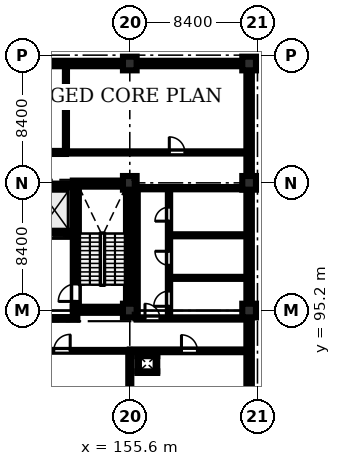
"""IFC4 building model, lengths in metres.
Left out: names, types, materials, properties, quantities, classifications, styles, units other than length and angle.
Written with IfcOpenShell. Run it as: python <this file> out.ifc"""

import sys

from ifc_helpers import new_model, si_unit, direction, frame, frame_2d, origin, origin_2d, place, context, subcontext, project, spatial, rectangle, extrude, element, fill, save


model = new_model("IFC4")
c1 = context("Model", 3, precision=1e-05, world=origin(), true_north=direction((0.0, 1.0)))
c2 = subcontext(c1, "Body", "Model", "MODEL_VIEW")
j1 = project(units=[si_unit("LENGTHUNIT", "METRE"), si_unit("PLANEANGLEUNIT", "RADIAN")], contexts=[c1])
p1 = place(None, origin())
s1 = spatial("IfcSite", under=j1, at=p1, CompositionType="ELEMENT")
p2 = place(p1, origin())
s2 = spatial("IfcBuilding", under=s1, at=p2, CompositionType="ELEMENT")
p3 = place(p2, frame((0.0, 0.0, 19.2)))
s3 = spatial("IfcBuildingStorey", under=s2, at=p3, CompositionType="ELEMENT", Elevation=19.2)
for number, where, z_axis, x_axis in (
    (1, (155.6, 95.2, 0.0), (0.0, 0.0, 1.0), (1.0, 0.0, 0.0)),
    (2, (155.6, 103.6, 0.0), (0.0, 0.0, 1.0), (1.0, 0.0, 0.0)),
    (3, (155.6, 111.45, 0.0), (0.0, 0.0, 1.0), (1.0, 0.0, 0.0)),
    (4, (163.45, 95.2, 0.0), (0.0, 0.0, 1.0), (1.0, 0.0, 0.0)),
    (5, (163.45, 103.6, 0.0), (0.0, 0.0, 1.0), (1.0, 0.0, 0.0)),
    (6, (163.45, 111.45, 0.0), (0.0, 0.0, 1.0), (1.0, 0.0, 0.0)),
):
    element("IfcColumn", number, at=place(p3, frame(where, z_axis=z_axis, x_axis=x_axis)), inside=s3, PredefinedType="COLUMN", context=c2, shape_type="SweptSolid", body=[
        extrude(rectangle(XDim=0.9, YDim=0.9, at=origin_2d()), origin(), (0.0, 0.0, 1.0), 4.02),
    ])
for number, where, z_axis, x_axis in (
    (7, (151.85, 95.25, 0.0), (0.0, 0.0, 1.0), (1.0, 0.0, 0.0)),
    (8, (151.85, 103.55, 0.0), (0.0, 0.0, 1.0), (1.0, 0.0, 0.0)),
):
    element("IfcWall", number, at=place(p3, frame(where, z_axis=z_axis, x_axis=x_axis)), inside=s3, PredefinedType="SHEAR", context=c2, shape_type="SweptSolid", body=[
        extrude(rectangle(XDim=3.9, YDim=0.4, at=frame_2d((1.95, 0.0))), origin(), (0.0, 0.0, 1.0), 4.02),
    ])
p4 = place(p3, frame((152.05, 95.45, 0.0), z_axis=(0.0, 0.0, 1.0), x_axis=(0.0, 1.0, 0.0)))
e9 = element("IfcWall", 9, at=p4, inside=s3, PredefinedType="SHEAR", context=c2, shape_type="SweptSolid", body=[
    extrude(rectangle(XDim=7.9, YDim=0.4, at=frame_2d((3.95, 0.0))), origin(), (0.0, 0.0, 1.0), 4.02),
])
p5 = place(p4, frame((0.35, 0.0, 0.0)))
e10 = element("IfcOpeningElement", 10, at=p5, cuts=e9, PredefinedType="OPENING", context=c2, shape_type="SweptSolid", body=[
    extrude(rectangle(XDim=1.15, YDim=2.15, at=frame_2d((0.575, 1.075))), frame((0.0, 0.21, 0.0), z_axis=(0.0, -1.0, 0.0), x_axis=(1.0, 0.0, 0.0)), (0.0, 0.0, 1.0), 0.42),
])
p6 = place(p3, frame((155.55, 95.45, 0.0), z_axis=(0.0, 0.0, 1.0), x_axis=(0.0, 1.0, 0.0)))
e11 = element("IfcWall", 11, at=p6, inside=s3, PredefinedType="SHEAR", context=c2, shape_type="SweptSolid", body=[
    extrude(rectangle(XDim=7.9, YDim=0.4, at=frame_2d((3.95, 0.0))), origin(), (0.0, 0.0, 1.0), 4.02),
])
p7 = place(p3, frame((149.45, 100.175, 0.0), z_axis=(0.0, 0.0, 1.0), x_axis=(1.0, 0.0, 0.0)))
e12 = element("IfcWall", 12, at=p7, inside=s3, PredefinedType="SHEAR", context=c2, shape_type="SweptSolid", body=[
    extrude(rectangle(XDim=2.4, YDim=0.25, at=frame_2d((1.2, 0.0))), origin(), (0.0, 0.0, 1.0), 4.02),
])
p8 = place(p7, frame((0.55, 0.0, 0.0)))
e13 = element("IfcOpeningElement", 13, at=p8, cuts=e12, PredefinedType="OPENING", context=c2, shape_type="SweptSolid", body=[
    extrude(rectangle(XDim=1.3, YDim=2.25, at=frame_2d((0.65, 1.125))), frame((0.0, 0.135, 0.0), z_axis=(0.0, -1.0, 0.0), x_axis=(1.0, 0.0, 0.0)), (0.0, 0.0, 1.0), 0.27),
])
p9 = place(p3, frame((149.45, 103.425, 0.0), z_axis=(0.0, 0.0, 1.0), x_axis=(1.0, 0.0, 0.0)))
e14 = element("IfcWall", 14, at=p9, inside=s3, PredefinedType="SHEAR", context=c2, shape_type="SweptSolid", body=[
    extrude(rectangle(XDim=2.4, YDim=0.25, at=frame_2d((1.2, 0.0))), origin(), (0.0, 0.0, 1.0), 4.02),
])
p10 = place(p3, frame((147.65, 111.45, 0.0), z_axis=(0.0, 0.0, 1.0), x_axis=(1.0, 0.0, 0.0)))
e15 = element("IfcWall", 15, at=p10, inside=s3, PredefinedType="STANDARD", context=c2, shape_type="SweptSolid", body=[
    extrude(rectangle(XDim=7.5, YDim=0.36, at=frame_2d((3.75, 0.0))), origin(), (0.0, 0.0, 1.0), 3.32),
])
p11 = place(p10, frame((1.3, 0.0, 1.1)))
e16 = element("IfcOpeningElement", 16, at=p11, cuts=e15, PredefinedType="OPENING", context=c2, shape_type="SweptSolid", body=[
    extrude(rectangle(XDim=1.2, YDim=1.5, at=frame_2d((0.6, 0.75))), frame((0.0, 0.19, 0.0), z_axis=(0.0, -1.0, 0.0), x_axis=(1.0, 0.0, 0.0)), (0.0, 0.0, 1.0), 0.38),
])
p12 = place(p10, frame((5.1, 0.0, 1.1)))
e17 = element("IfcOpeningElement", 17, at=p12, cuts=e15, PredefinedType="OPENING", context=c2, shape_type="SweptSolid", body=[
    extrude(rectangle(XDim=1.2, YDim=1.5, at=frame_2d((0.6, 0.75))), frame((0.0, 0.19, 0.0), z_axis=(0.0, -1.0, 0.0), x_axis=(1.0, 0.0, 0.0)), (0.0, 0.0, 1.0), 0.38),
])
p13 = place(p3, frame((156.05, 111.45, 0.0), z_axis=(0.0, 0.0, 1.0), x_axis=(1.0, 0.0, 0.0)))
e18 = element("IfcWall", 18, at=p13, inside=s3, PredefinedType="STANDARD", context=c2, shape_type="SweptSolid", body=[
    extrude(rectangle(XDim=6.95, YDim=0.36, at=frame_2d((3.475, 0.0))), origin(), (0.0, 0.0, 1.0), 3.32),
])
p14 = place(p13, frame((1.3, 0.0, 1.1)))
e19 = element("IfcOpeningElement", 19, at=p14, cuts=e18, PredefinedType="OPENING", context=c2, shape_type="SweptSolid", body=[
    extrude(rectangle(XDim=1.2, YDim=1.5, at=frame_2d((0.6, 0.75))), frame((0.0, 0.19, 0.0), z_axis=(0.0, -1.0, 0.0), x_axis=(1.0, 0.0, 0.0)), (0.0, 0.0, 1.0), 0.38),
])
p15 = place(p13, frame((5.1, 0.0, 1.1)))
e20 = element("IfcOpeningElement", 20, at=p15, cuts=e18, PredefinedType="OPENING", context=c2, shape_type="SweptSolid", body=[
    extrude(rectangle(XDim=1.2, YDim=1.5, at=frame_2d((0.6, 0.75))), frame((0.0, 0.19, 0.0), z_axis=(0.0, -1.0, 0.0), x_axis=(1.0, 0.0, 0.0)), (0.0, 0.0, 1.0), 0.38),
])
p16 = place(p3, frame((163.45, 94.75, 0.0), z_axis=(0.0, 0.0, 1.0), x_axis=(0.0, -1.0, 0.0)))
e21 = element("IfcWall", 21, at=p16, inside=s3, PredefinedType="STANDARD", context=c2, shape_type="SweptSolid", body=[
    extrude(rectangle(XDim=7.5, YDim=0.36, at=frame_2d((3.75, 0.0))), origin(), (0.0, 0.0, 1.0), 3.32),
])
p17 = place(p16, frame((4.2, 0.0, 1.1)))
e22 = element("IfcOpeningElement", 22, at=p17, cuts=e21, PredefinedType="OPENING", context=c2, shape_type="SweptSolid", body=[
    extrude(rectangle(XDim=1.8, YDim=1.8, at=frame_2d((0.9, 0.9))), frame((0.0, 0.19, 0.0), z_axis=(0.0, -1.0, 0.0), x_axis=(1.0, 0.0, 0.0)), (0.0, 0.0, 1.0), 0.38),
])
p18 = place(p3, frame((163.45, 103.15, 0.0), z_axis=(0.0, 0.0, 1.0), x_axis=(0.0, -1.0, 0.0)))
e23 = element("IfcWall", 23, at=p18, inside=s3, PredefinedType="STANDARD", context=c2, shape_type="SweptSolid", body=[
    extrude(rectangle(XDim=7.5, YDim=0.36, at=frame_2d((3.75, 0.0))), origin(), (0.0, 0.0, 1.0), 3.32),
])
p19 = place(p18, frame((1.15, 0.0, 1.1)))
e24 = element("IfcOpeningElement", 24, at=p19, cuts=e23, PredefinedType="OPENING", context=c2, shape_type="SweptSolid", body=[
    extrude(rectangle(XDim=1.4, YDim=1.4, at=frame_2d((0.7, 0.7))), frame((0.0, 0.19, 0.0), z_axis=(0.0, -1.0, 0.0), x_axis=(1.0, 0.0, 0.0)), (0.0, 0.0, 1.0), 0.38),
])
p20 = place(p3, frame((163.45, 111.0, 0.0), z_axis=(0.0, 0.0, 1.0), x_axis=(0.0, -1.0, 0.0)))
e25 = element("IfcWall", 25, at=p20, inside=s3, PredefinedType="STANDARD", context=c2, shape_type="SweptSolid", body=[
    extrude(rectangle(XDim=6.95, YDim=0.36, at=frame_2d((3.475, 0.0))), origin(), (0.0, 0.0, 1.0), 3.32),
])
p21 = place(p20, frame((1.15, 0.0, 1.1)))
e26 = element("IfcOpeningElement", 26, at=p21, cuts=e25, PredefinedType="OPENING", context=c2, shape_type="SweptSolid", body=[
    extrude(rectangle(XDim=1.8, YDim=1.8, at=frame_2d((0.9, 0.9))), frame((0.0, 0.19, 0.0), z_axis=(0.0, -1.0, 0.0), x_axis=(1.0, 0.0, 0.0)), (0.0, 0.0, 1.0), 0.38),
])
p22 = place(p3, frame((147.3, 94.68, 0.0), z_axis=(0.0, 0.0, 1.0), x_axis=(1.0, 0.0, 0.0)))
e27 = element("IfcWall", 27, at=p22, inside=s3, PredefinedType="STANDARD", context=c2, shape_type="SweptSolid", body=[
    extrude(rectangle(XDim=4.85, YDim=0.18, at=frame_2d((2.425, 0.0))), origin(), (0.0, 0.0, 1.0), 4.02),
])
p23 = place(p22, frame((1.6, 0.0, 0.0)))
e28 = element("IfcOpeningElement", 28, at=p23, cuts=e27, PredefinedType="OPENING", context=c2, shape_type="SweptSolid", body=[
    extrude(rectangle(XDim=1.15, YDim=2.15, at=frame_2d((0.575, 1.075))), frame((0.0, 0.1, 0.0), z_axis=(0.0, -1.0, 0.0), x_axis=(1.0, 0.0, 0.0)), (0.0, 0.0, 1.0), 0.2),
])
p24 = place(p3, frame((156.05, 94.68, 0.0), z_axis=(0.0, 0.0, 1.0), x_axis=(1.0, 0.0, 0.0)))
e29 = element("IfcWall", 29, at=p24, inside=s3, PredefinedType="PARTITIONING", context=c2, shape_type="SweptSolid", body=[
    extrude(rectangle(XDim=7.15, YDim=0.15, at=frame_2d((3.575, 0.0))), origin(), (0.0, 0.0, 1.0), 4.02),
])
p25 = place(p24, frame((0.55, 0.0, 0.0)))
e30 = element("IfcOpeningElement", 30, at=p25, cuts=e29, PredefinedType="OPENING", context=c2, shape_type="SweptSolid", body=[
    extrude(rectangle(XDim=0.98, YDim=2.12, at=frame_2d((0.49, 1.06))), frame((0.0, 0.085, 0.0), z_axis=(0.0, -1.0, 0.0), x_axis=(1.0, 0.0, 0.0)), (0.0, 0.0, 1.0), 0.17),
])
p26 = place(p3, frame((158.18, 94.68, 0.0), z_axis=(0.0, 0.0, 1.0), x_axis=(0.0, 1.0, 0.0)))
e31 = element("IfcWall", 31, at=p26, inside=s3, PredefinedType="PARTITIONING", context=c2, shape_type="SweptSolid", body=[
    extrude(rectangle(XDim=8.57, YDim=0.15, at=frame_2d((4.285, 0.0))), origin(), (0.0, 0.0, 1.0), 4.02),
])
p27 = place(p26, frame((0.8, 0.0, 0.0)))
e32 = element("IfcOpeningElement", 32, at=p27, cuts=e31, PredefinedType="OPENING", context=c2, shape_type="SweptSolid", body=[
    extrude(rectangle(XDim=1.0, YDim=2.12, at=frame_2d((0.5, 1.06))), frame((0.0, 0.085, 0.0), z_axis=(0.0, -1.0, 0.0), x_axis=(1.0, 0.0, 0.0)), (0.0, 0.0, 1.0), 0.17),
])
p28 = place(p26, frame((3.5, 0.0, 0.0)))
e33 = element("IfcOpeningElement", 33, at=p28, cuts=e31, PredefinedType="OPENING", context=c2, shape_type="SweptSolid", body=[
    extrude(rectangle(XDim=0.92, YDim=2.1, at=frame_2d((0.46, 1.05))), frame((0.0, 0.085, 0.0), z_axis=(0.0, -1.0, 0.0), x_axis=(1.0, 0.0, 0.0)), (0.0, 0.0, 1.0), 0.17),
])
p29 = place(p26, frame((6.4, 0.0, 0.0)))
e34 = element("IfcOpeningElement", 34, at=p29, cuts=e31, PredefinedType="OPENING", context=c2, shape_type="SweptSolid", body=[
    extrude(rectangle(XDim=0.92, YDim=2.1, at=frame_2d((0.46, 1.05))), frame((0.0, 0.085, 0.0), z_axis=(0.0, -1.0, 0.0), x_axis=(1.0, 0.0, 0.0)), (0.0, 0.0, 1.0), 0.17),
])
for number, where, z_axis, x_axis in (
    (35, (158.18, 97.35, 0.0), (0.0, 0.0, 1.0), (1.0, 0.0, 0.0)),
    (36, (158.18, 100.15, 0.0), (0.0, 0.0, 1.0), (1.0, 0.0, 0.0)),
):
    element("IfcWall", number, at=place(p3, frame(where, z_axis=z_axis, x_axis=x_axis)), inside=s3, PredefinedType="PARTITIONING", context=c2, shape_type="SweptSolid", body=[
        extrude(rectangle(XDim=5.02, YDim=0.135, at=frame_2d((2.51, 0.0))), origin(), (0.0, 0.0, 1.0), 4.02),
    ])
p30 = place(p3, frame((156.05, 103.25, 0.0), z_axis=(0.0, 0.0, 1.0), x_axis=(1.0, 0.0, 0.0)))
e37 = element("IfcWall", 37, at=p30, inside=s3, PredefinedType="PARTITIONING", context=c2, shape_type="SweptSolid", body=[
    extrude(rectangle(XDim=7.15, YDim=0.15, at=frame_2d((3.575, 0.0))), origin(), (0.0, 0.0, 1.0), 4.02),
])
p31 = place(p3, frame((156.05, 94.68, 0.0), z_axis=(0.0, 0.0, 1.0), x_axis=(0.0, 1.0, 0.0)))
e38 = element("IfcWall", 38, at=p31, inside=s3, PredefinedType="PARTITIONING", context=c2, shape_type="SweptSolid", body=[
    extrude(rectangle(XDim=8.57, YDim=0.15, at=frame_2d((4.285, 0.0))), origin(), (0.0, 0.0, 1.0), 4.02),
])
p32 = place(p3, frame((134.6, 105.6, 0.0), z_axis=(0.0, 0.0, 1.0), x_axis=(1.0, 0.0, 0.0)))
e39 = element("IfcWall", 39, at=p32, inside=s3, PredefinedType="SOLIDWALL", context=c2, shape_type="SweptSolid", body=[
    extrude(rectangle(XDim=16.8, YDim=0.2, at=frame_2d((8.4, 0.0))), origin(), (0.0, 0.0, 1.0), 4.02),
])
p33 = place(p32, frame((6.8, 0.0, 0.0)))
e40 = element("IfcOpeningElement", 40, at=p33, cuts=e39, PredefinedType="OPENING", context=c2, shape_type="SweptSolid", body=[
    extrude(rectangle(XDim=1.5, YDim=2.2, at=frame_2d((0.75, 1.1))), frame((0.0, 0.11, 0.0), z_axis=(0.0, -1.0, 0.0), x_axis=(1.0, 0.0, 0.0)), (0.0, 0.0, 1.0), 0.22),
])
p34 = place(p3, frame((151.4, 105.6, 0.0), z_axis=(0.0, 0.0, 1.0), x_axis=(1.0, 0.0, 0.0)))
e41 = element("IfcWall", 41, at=p34, inside=s3, PredefinedType="PARTITIONING", context=c2, shape_type="SweptSolid", body=[
    extrude(rectangle(XDim=11.95, YDim=0.145, at=frame_2d((5.975, 0.0))), origin(), (0.0, 0.0, 1.0), 4.02),
])
p35 = place(p34, frame((6.8, 0.0, 0.0)))
e42 = element("IfcOpeningElement", 42, at=p35, cuts=e41, PredefinedType="OPENING", context=c2, shape_type="SweptSolid", body=[
    extrude(rectangle(XDim=1.02, YDim=2.15, at=frame_2d((0.51, 1.075))), frame((0.0, 0.083, 0.0), z_axis=(0.0, -1.0, 0.0), x_axis=(1.0, 0.0, 0.0)), (0.0, 0.0, 1.0), 0.165),
])
p36 = place(p3, frame((151.4, 105.6, 0.0), z_axis=(0.0, 0.0, 1.0), x_axis=(0.0, 1.0, 0.0)))
e43 = element("IfcWall", 43, at=p36, inside=s3, PredefinedType="PARTITIONING", context=c2, shape_type="SweptSolid", body=[
    extrude(rectangle(XDim=5.75, YDim=0.135, at=frame_2d((2.875, 0.0))), origin(), (0.0, 0.0, 1.0), 3.52),
])
p37 = place(p3, frame((147.2, 92.55, 0.0), z_axis=(0.0, 0.0, 1.0), x_axis=(1.0, 0.0, 0.0)))
e44 = element("IfcWall", 44, at=p37, inside=s3, PredefinedType="PARTITIONING", context=c2, shape_type="SweptSolid", body=[
    extrude(rectangle(XDim=8.4, YDim=0.12, at=frame_2d((4.2, 0.0))), origin(), (0.0, 0.0, 1.0), 4.02),
])
p38 = place(p37, frame((3.4, 0.0, 0.0)))
e45 = element("IfcOpeningElement", 45, at=p38, cuts=e44, PredefinedType="OPENING", context=c2, shape_type="SweptSolid", body=[
    extrude(rectangle(XDim=1.08, YDim=2.15, at=frame_2d((0.54, 1.075))), frame((0.0, 0.07, 0.0), z_axis=(0.0, -1.0, 0.0), x_axis=(1.0, 0.0, 0.0)), (0.0, 0.0, 1.0), 0.14),
])
p39 = place(p3, frame((155.6, 92.55, 0.0), z_axis=(0.0, 0.0, 1.0), x_axis=(1.0, 0.0, 0.0)))
e46 = element("IfcWall", 46, at=p39, inside=s3, PredefinedType="STANDARD", context=c2, shape_type="SweptSolid", body=[
    extrude(rectangle(XDim=7.75, YDim=0.18, at=frame_2d((3.875, 0.0))), origin(), (0.0, 0.0, 1.0), 4.02),
])
p40 = place(p39, frame((3.4, 0.0, 0.0)))
e47 = element("IfcOpeningElement", 47, at=p40, cuts=e46, PredefinedType="OPENING", context=c2, shape_type="SweptSolid", body=[
    extrude(rectangle(XDim=1.05, YDim=2.15, at=frame_2d((0.525, 1.075))), frame((0.0, 0.1, 0.0), z_axis=(0.0, -1.0, 0.0), x_axis=(1.0, 0.0, 0.0)), (0.0, 0.0, 1.0), 0.2),
])
p41 = place(p3, frame((155.6, 78.55, 0.0), z_axis=(0.0, 0.0, 1.0), x_axis=(0.0, 1.0, 0.0)))
e48 = element("IfcWall", 48, at=p41, inside=s3, PredefinedType="SOLIDWALL", context=c2, shape_type="SweptSolid", body=[
    extrude(rectangle(XDim=14.0, YDim=0.2, at=frame_2d((7.0, 0.0))), origin(), (0.0, 0.0, 1.0), 3.32),
])
for number, where, z_axis, x_axis in (
    (49, (156.095, 91.147, 0.0), (0.0, 0.0, 1.0), (1.0, 0.0, 0.0)),
    (50, (156.095, 92.252, 0.0), (0.0, 0.0, 1.0), (1.0, 0.0, 0.0)),
):
    element("IfcWall", number, at=place(p3, frame(where, z_axis=z_axis, x_axis=x_axis)), inside=s3, PredefinedType="PARTITIONING", context=c2, shape_type="SweptSolid", body=[
        extrude(rectangle(XDim=1.31, YDim=0.105, at=frame_2d((0.655, 0.0))), origin(), (0.0, 0.0, 1.0), 4.02),
    ])
for number, where, z_axis, x_axis in (
    (51, (156.147, 91.2, 0.0), (0.0, 0.0, 1.0), (0.0, 1.0, 0.0)),
    (52, (157.353, 91.2, 0.0), (0.0, 0.0, 1.0), (0.0, 1.0, 0.0)),
):
    element("IfcWall", number, at=place(p3, frame(where, z_axis=z_axis, x_axis=x_axis)), inside=s3, PredefinedType="PARTITIONING", context=c2, shape_type="SweptSolid", body=[
        extrude(rectangle(XDim=1.0, YDim=0.105, at=frame_2d((0.5, 0.0))), origin(), (0.0, 0.0, 1.0), 4.02),
    ])
p42 = place(p12, origin())
e53 = element("IfcWindow", 53, at=p42, inside=s3, PartitioningType="SINGLE_PANEL", PredefinedType="WINDOW", context=c2, shape_type="SweptSolid", body=[
    extrude(rectangle(XDim=1.2, YDim=1.5, at=frame_2d((0.6, 0.75))), frame((0.0, 0.03, 0.0), z_axis=(0.0, -1.0, 0.0), x_axis=(1.0, 0.0, 0.0)), (0.0, 0.0, 1.0), 0.06),
])
fill(e17, e53)
p43 = place(p14, origin())
e54 = element("IfcWindow", 54, at=p43, inside=s3, PartitioningType="SINGLE_PANEL", PredefinedType="WINDOW", context=c2, shape_type="SweptSolid", body=[
    extrude(rectangle(XDim=1.2, YDim=1.5, at=frame_2d((0.6, 0.75))), frame((0.0, 0.03, 0.0), z_axis=(0.0, -1.0, 0.0), x_axis=(1.0, 0.0, 0.0)), (0.0, 0.0, 1.0), 0.06),
])
fill(e19, e54)
p44 = place(p15, origin())
e55 = element("IfcWindow", 55, at=p44, inside=s3, PartitioningType="SINGLE_PANEL", PredefinedType="WINDOW", context=c2, shape_type="SweptSolid", body=[
    extrude(rectangle(XDim=1.2, YDim=1.5, at=frame_2d((0.6, 0.75))), frame((0.0, 0.03, 0.0), z_axis=(0.0, -1.0, 0.0), x_axis=(1.0, 0.0, 0.0)), (0.0, 0.0, 1.0), 0.06),
])
fill(e20, e55)
p45 = place(p17, origin())
e56 = element("IfcWindow", 56, at=p45, inside=s3, PartitioningType="DOUBLE_PANEL_VERTICAL", PredefinedType="WINDOW", context=c2, shape_type="SweptSolid", body=[
    extrude(rectangle(XDim=1.8, YDim=1.8, at=frame_2d((0.9, 0.9))), frame((0.0, 0.03, 0.0), z_axis=(0.0, -1.0, 0.0), x_axis=(1.0, 0.0, 0.0)), (0.0, 0.0, 1.0), 0.06),
])
fill(e22, e56)
p46 = place(p19, origin())
e57 = element("IfcWindow", 57, at=p46, inside=s3, PartitioningType="SINGLE_PANEL", PredefinedType="WINDOW", context=c2, shape_type="SweptSolid", body=[
    extrude(rectangle(XDim=1.4, YDim=1.4, at=frame_2d((0.7, 0.7))), frame((0.0, 0.03, 0.0), z_axis=(0.0, -1.0, 0.0), x_axis=(1.0, 0.0, 0.0)), (0.0, 0.0, 1.0), 0.06),
])
fill(e24, e57)
p47 = place(p21, origin())
e58 = element("IfcWindow", 58, at=p47, inside=s3, PartitioningType="DOUBLE_PANEL_VERTICAL", PredefinedType="WINDOW", context=c2, shape_type="SweptSolid", body=[
    extrude(rectangle(XDim=1.8, YDim=1.8, at=frame_2d((0.9, 0.9))), frame((0.0, 0.03, 0.0), z_axis=(0.0, -1.0, 0.0), x_axis=(1.0, 0.0, 0.0)), (0.0, 0.0, 1.0), 0.06),
])
fill(e26, e58)
p48 = place(p25, origin())
e59 = element("IfcDoor", 59, at=p48, inside=s3, OperationType="SINGLE_SWING_LEFT", PredefinedType="DOOR", context=c2, shape_type="SweptSolid", body=[
    extrude(rectangle(XDim=0.98, YDim=2.12, at=frame_2d((0.49, 1.06))), frame((0.0, 0.025, 0.0), z_axis=(0.0, -1.0, 0.0), x_axis=(1.0, 0.0, 0.0)), (0.0, 0.0, 1.0), 0.05),
])
fill(e30, e59)
p49 = place(p27, origin())
e60 = element("IfcDoor", 60, at=p49, inside=s3, OperationType="SINGLE_SWING_LEFT", PredefinedType="DOOR", context=c2, shape_type="SweptSolid", body=[
    extrude(rectangle(XDim=1.0, YDim=2.12, at=frame_2d((0.5, 1.06))), frame((0.0, 0.025, 0.0), z_axis=(0.0, -1.0, 0.0), x_axis=(1.0, 0.0, 0.0)), (0.0, 0.0, 1.0), 0.05),
])
fill(e32, e60)
p50 = place(p28, origin())
e61 = element("IfcDoor", 61, at=p50, inside=s3, OperationType="SINGLE_SWING_RIGHT", PredefinedType="DOOR", context=c2, shape_type="SweptSolid", body=[
    extrude(rectangle(XDim=0.92, YDim=2.1, at=frame_2d((0.46, 1.05))), frame((0.0, 0.025, 0.0), z_axis=(0.0, -1.0, 0.0), x_axis=(1.0, 0.0, 0.0)), (0.0, 0.0, 1.0), 0.05),
])
fill(e33, e61)
p51 = place(p29, origin())
e62 = element("IfcDoor", 62, at=p51, inside=s3, OperationType="SINGLE_SWING_LEFT", PredefinedType="DOOR", context=c2, shape_type="SweptSolid", body=[
    extrude(rectangle(XDim=0.92, YDim=2.1, at=frame_2d((0.46, 1.05))), frame((0.0, 0.025, 0.0), z_axis=(0.0, -1.0, 0.0), x_axis=(1.0, 0.0, 0.0)), (0.0, 0.0, 1.0), 0.05),
])
fill(e34, e62)
p52 = place(p35, origin())
e63 = element("IfcDoor", 63, at=p52, inside=s3, OperationType="SINGLE_SWING_LEFT", PredefinedType="DOOR", context=c2, shape_type="SweptSolid", body=[
    extrude(rectangle(XDim=1.02, YDim=2.15, at=frame_2d((0.51, 1.075))), frame((0.0, 0.025, 0.0), z_axis=(0.0, -1.0, 0.0), x_axis=(1.0, 0.0, 0.0)), (0.0, 0.0, 1.0), 0.05),
])
fill(e42, e63)
p53 = place(p38, origin())
e64 = element("IfcDoor", 64, at=p53, inside=s3, OperationType="SINGLE_SWING_RIGHT", PredefinedType="DOOR", context=c2, shape_type="SweptSolid", body=[
    extrude(rectangle(XDim=1.08, YDim=2.15, at=frame_2d((0.54, 1.075))), frame((0.0, 0.025, 0.0), z_axis=(0.0, -1.0, 0.0), x_axis=(1.0, 0.0, 0.0)), (0.0, 0.0, 1.0), 0.05),
])
fill(e45, e64)
p54 = place(p40, origin())
e65 = element("IfcDoor", 65, at=p54, inside=s3, OperationType="SINGLE_SWING_LEFT", PredefinedType="DOOR", context=c2, shape_type="SweptSolid", body=[
    extrude(rectangle(XDim=1.05, YDim=2.15, at=frame_2d((0.525, 1.075))), frame((0.0, 0.025, 0.0), z_axis=(0.0, -1.0, 0.0), x_axis=(1.0, 0.0, 0.0)), (0.0, 0.0, 1.0), 0.05),
])
fill(e47, e65)
p55 = place(p5, origin())
e66 = element("IfcDoor", 66, at=p55, inside=s3, OperationType="SINGLE_SWING_LEFT", PredefinedType="DOOR", context=c2, shape_type="SweptSolid", body=[
    extrude(rectangle(XDim=1.15, YDim=2.15, at=frame_2d((0.575, 1.075))), frame((0.0, 0.025, 0.0), z_axis=(0.0, -1.0, 0.0), x_axis=(1.0, 0.0, 0.0)), (0.0, 0.0, 1.0), 0.05),
])
fill(e10, e66)
p56 = place(p8, origin())
e67 = element("IfcDoor", 67, at=p56, inside=s3, OperationType="SLIDING_TO_LEFT", PredefinedType="DOOR", context=c2, shape_type="SweptSolid", body=[
    extrude(rectangle(XDim=1.3, YDim=2.25, at=frame_2d((0.65, 1.125))), frame((0.0, 0.025, 0.0), z_axis=(0.0, -1.0, 0.0), x_axis=(1.0, 0.0, 0.0)), (0.0, 0.0, 1.0), 0.05),
])
fill(e13, e67)
save(model, sys.argv[1])
